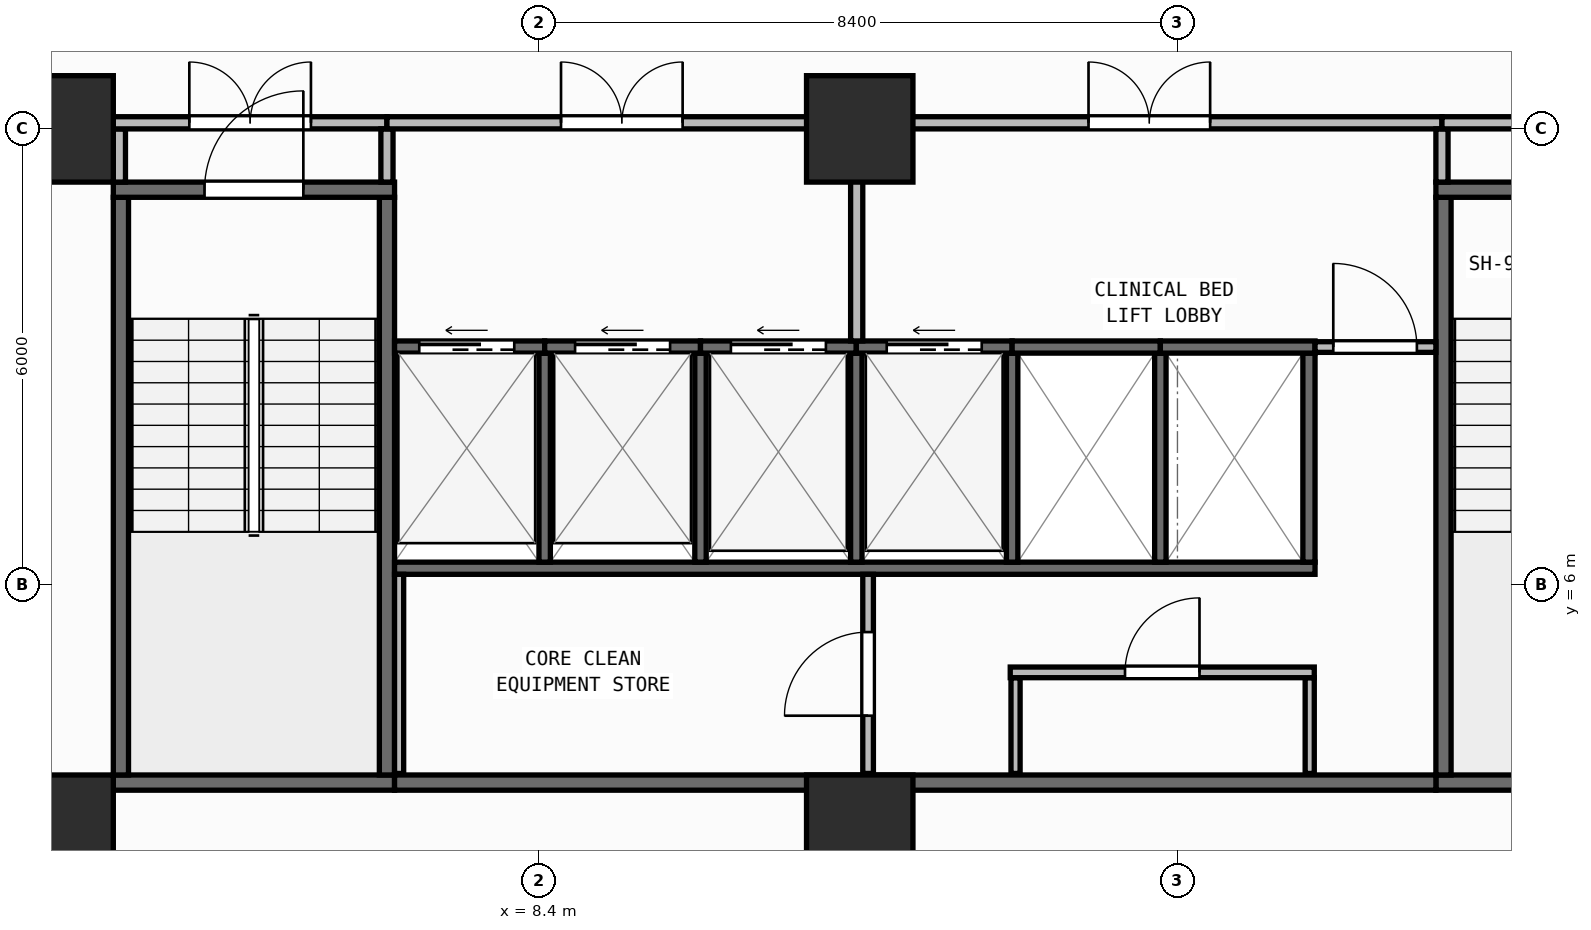
"""IFC4 building model, lengths in metres.
Left out: names, types, materials, properties, quantities, classifications, styles, units other than length and angle.
Written with IfcOpenShell. Run it as: python <this file> out.ifc"""

import sys

from ifc_helpers import new_model, si_unit, direction, frame, frame_2d, origin, origin_2d, place, context, subcontext, project, spatial, rectangle, extrude, element, fill, save


model = new_model("IFC4")
c1 = context("Model", 3, precision=1e-05, world=origin(), true_north=direction((0.0, 1.0)))
c2 = subcontext(c1, "Body", "Model", "MODEL_VIEW")
j1 = project(units=[si_unit("LENGTHUNIT", "METRE"), si_unit("PLANEANGLEUNIT", "RADIAN")], contexts=[c1])
p1 = place(None, origin())
s1 = spatial("IfcSite", under=j1, at=p1, CompositionType="ELEMENT")
p2 = place(p1, origin())
s2 = spatial("IfcBuilding", under=s1, at=p2, CompositionType="ELEMENT")
p3 = place(p2, frame((0.0, 0.0, 77.8)))
s3 = spatial("IfcBuildingStorey", under=s2, at=p3, CompositionType="ELEMENT", Elevation=77.8)
for number, where, z_axis, x_axis in (
    (1, (2.1, 2.8, 0.0), (0.0, 0.0, 1.0), (1.0, 0.0, 0.0)),
    (2, (12.62, 2.8, 0.0), (0.0, 0.0, 1.0), (1.0, 0.0, 0.0)),
    (3, (2.1, 12.0, 0.0), (0.0, 0.0, 1.0), (1.0, 0.0, 0.0)),
    (4, (12.62, 12.0, 0.0), (0.0, 0.0, 1.0), (1.0, 0.0, 0.0)),
):
    element("IfcColumn", number, at=place(p3, frame(where, z_axis=z_axis, x_axis=x_axis)), inside=s3, PredefinedType="COLUMN", context=c2, shape_type="SweptSolid", body=[
        extrude(rectangle(XDim=1.4, YDim=1.4, at=origin_2d()), origin(), (0.0, 0.0, 1.0), 3.95),
    ])
p4 = place(p3, frame((2.76, 0.174, 0.0), z_axis=(0.0, 0.0, 1.0), x_axis=(0.996571478456, 0.082736257641, 0.0)))
e5 = element("IfcWall", 5, at=p4, inside=s3, PredefinedType="STANDARD", context=c2, shape_type="SweptSolid", body=[
    extrude(rectangle(XDim=52.861, YDim=0.26, at=frame_2d((26.431, 0.0))), origin(), (0.0, 0.0, 1.0), 3.71),
])
p5 = place(p4, frame((25.231, 0.0, 0.9)))
e6 = element("IfcOpeningElement", 6, at=p5, cuts=e5, PredefinedType="OPENING", context=c2, shape_type="SweptSolid", body=[
    extrude(rectangle(XDim=2.4, YDim=1.65, at=frame_2d((1.2, 0.825))), frame((0.0, 0.14, 0.0), z_axis=(0.0, -1.0, 0.0), x_axis=(1.0, 0.0, 0.0)), (0.0, 0.0, 1.0), 0.28),
])
p6 = place(p3, frame((2.8, 3.4, 0.0), z_axis=(0.0, 0.0, 1.0), x_axis=(1.0, 0.0, 0.0)))
e7 = element("IfcWall", 7, at=p6, inside=s3, PredefinedType="SHEAR", context=c2, shape_type="SweptSolid", body=[
    extrude(rectangle(XDim=3.7, YDim=0.2, at=frame_2d((1.85, 0.0))), origin(), (0.0, 0.0, 1.0), 3.71),
])
for number, where, z_axis, x_axis in (
    (8, (2.9, 3.5, 0.0), (0.0, 0.0, 1.0), (0.0, 1.0, 0.0)),
    (9, (6.4, 3.5, 0.0), (0.0, 0.0, 1.0), (0.0, 1.0, 0.0)),
):
    element("IfcWall", number, at=place(p3, frame(where, z_axis=z_axis, x_axis=x_axis)), inside=s3, PredefinedType="SHEAR", context=c2, shape_type="SweptSolid", body=[
        extrude(rectangle(XDim=7.6, YDim=0.2, at=frame_2d((3.8, 0.0))), origin(), (0.0, 0.0, 1.0), 3.71),
    ])
p7 = place(p3, frame((2.8, 11.2, 0.0), z_axis=(0.0, 0.0, 1.0), x_axis=(1.0, 0.0, 0.0)))
e10 = element("IfcWall", 10, at=p7, inside=s3, PredefinedType="SHEAR", context=c2, shape_type="SweptSolid", body=[
    extrude(rectangle(XDim=3.7, YDim=0.2, at=frame_2d((1.85, 0.0))), origin(), (0.0, 0.0, 1.0), 3.71),
])
p8 = place(p7, frame((1.2, 0.0, 0.0)))
e11 = element("IfcOpeningElement", 11, at=p8, cuts=e10, PredefinedType="OPENING", context=c2, shape_type="SweptSolid", body=[
    extrude(rectangle(XDim=1.3, YDim=2.15, at=frame_2d((0.65, 1.075))), frame((0.0, 0.11, 0.0), z_axis=(0.0, -1.0, 0.0), x_axis=(1.0, 0.0, 0.0)), (0.0, 0.0, 1.0), 0.22),
])
p9 = place(p3, frame((20.2, 3.4, 0.0), z_axis=(0.0, 0.0, 1.0), x_axis=(1.0, 0.0, 0.0)))
e12 = element("IfcWall", 12, at=p9, inside=s3, PredefinedType="SHEAR", context=c2, shape_type="SweptSolid", body=[
    extrude(rectangle(XDim=3.7, YDim=0.2, at=frame_2d((1.85, 0.0))), origin(), (0.0, 0.0, 1.0), 3.71),
])
p10 = place(p3, frame((20.3, 3.5, 0.0), z_axis=(0.0, 0.0, 1.0), x_axis=(0.0, 1.0, 0.0)))
e13 = element("IfcWall", 13, at=p10, inside=s3, PredefinedType="SHEAR", context=c2, shape_type="SweptSolid", body=[
    extrude(rectangle(XDim=7.6, YDim=0.2, at=frame_2d((3.8, 0.0))), origin(), (0.0, 0.0, 1.0), 3.71),
])
p11 = place(p3, frame((20.2, 11.2, 0.0), z_axis=(0.0, 0.0, 1.0), x_axis=(1.0, 0.0, 0.0)))
e14 = element("IfcWall", 14, at=p11, inside=s3, PredefinedType="SHEAR", context=c2, shape_type="SweptSolid", body=[
    extrude(rectangle(XDim=3.7, YDim=0.2, at=frame_2d((1.85, 0.0))), origin(), (0.0, 0.0, 1.0), 3.71),
])
p12 = place(p11, frame((1.2, 0.0, 0.0)))
e15 = element("IfcOpeningElement", 15, at=p12, cuts=e14, PredefinedType="OPENING", context=c2, shape_type="SweptSolid", body=[
    extrude(rectangle(XDim=1.3, YDim=2.15, at=frame_2d((0.65, 1.075))), frame((0.0, 0.11, 0.0), z_axis=(0.0, -1.0, 0.0), x_axis=(1.0, 0.0, 0.0)), (0.0, 0.0, 1.0), 0.22),
])
p13 = place(p3, frame((6.5, 3.4, 0.0), z_axis=(0.0, 0.0, 1.0), x_axis=(1.0, 0.0, 0.0)))
e16 = element("IfcWall", 16, at=p13, inside=s3, PredefinedType="SHEAR", context=c2, shape_type="SweptSolid", body=[
    extrude(rectangle(XDim=13.7, YDim=0.2, at=frame_2d((6.85, 0.0))), origin(), (0.0, 0.0, 1.0), 3.71),
])
p14 = place(p3, frame((6.5, 6.22, 0.0), z_axis=(0.0, 0.0, 1.0), x_axis=(1.0, 0.0, 0.0)))
e17 = element("IfcWall", 17, at=p14, inside=s3, PredefinedType="SHEAR", context=c2, shape_type="SweptSolid", body=[
    extrude(rectangle(XDim=12.11, YDim=0.16, at=frame_2d((6.055, 0.0))), origin(), (0.0, 0.0, 1.0), 3.71),
])
p15 = place(p3, frame((18.53, 6.3, 0.0), z_axis=(0.0, 0.0, 1.0), x_axis=(0.0, 1.0, 0.0)))
e18 = element("IfcWall", 18, at=p15, inside=s3, PredefinedType="SHEAR", context=c2, shape_type="SweptSolid", body=[
    extrude(rectangle(XDim=2.75, YDim=0.16, at=frame_2d((1.375, 0.0))), origin(), (0.0, 0.0, 1.0), 3.71),
])
for number, where, z_axis, x_axis in (
    (19, (8.475, 6.3, 0.0), (0.0, 0.0, 1.0), (0.0, 1.0, 0.0)),
    (20, (10.525, 6.3, 0.0), (0.0, 0.0, 1.0), (0.0, 1.0, 0.0)),
    (21, (12.575, 6.3, 0.0), (0.0, 0.0, 1.0), (0.0, 1.0, 0.0)),
    (22, (14.625, 6.3, 0.0), (0.0, 0.0, 1.0), (0.0, 1.0, 0.0)),
    (23, (16.575, 6.3, 0.0), (0.0, 0.0, 1.0), (0.0, 1.0, 0.0)),
):
    element("IfcWall", number, at=place(p3, frame(where, z_axis=z_axis, x_axis=x_axis)), inside=s3, PredefinedType="SHEAR", context=c2, shape_type="SweptSolid", body=[
        extrude(rectangle(XDim=2.75, YDim=0.15, at=frame_2d((1.375, 0.0))), origin(), (0.0, 0.0, 1.0), 3.71),
    ])
p16 = place(p3, frame((6.5, 9.13, 0.0), z_axis=(0.0, 0.0, 1.0), x_axis=(1.0, 0.0, 0.0)))
e24 = element("IfcWall", 24, at=p16, inside=s3, PredefinedType="SHEAR", context=c2, shape_type="SweptSolid", body=[
    extrude(rectangle(XDim=1.975, YDim=0.16, at=frame_2d((0.988, 0.0))), origin(), (0.0, 0.0, 1.0), 3.71),
])
p17 = place(p16, frame((0.325, 0.0, 0.0)))
e25 = element("IfcOpeningElement", 25, at=p17, cuts=e24, PredefinedType="OPENING", context=c2, shape_type="SweptSolid", body=[
    extrude(rectangle(XDim=1.25, YDim=2.15, at=frame_2d((0.625, 1.075))), frame((0.0, 0.09, 0.0), z_axis=(0.0, -1.0, 0.0), x_axis=(1.0, 0.0, 0.0)), (0.0, 0.0, 1.0), 0.18),
])
p18 = place(p3, frame((8.475, 9.13, 0.0), z_axis=(0.0, 0.0, 1.0), x_axis=(1.0, 0.0, 0.0)))
e26 = element("IfcWall", 26, at=p18, inside=s3, PredefinedType="SHEAR", context=c2, shape_type="SweptSolid", body=[
    extrude(rectangle(XDim=2.05, YDim=0.16, at=frame_2d((1.025, 0.0))), origin(), (0.0, 0.0, 1.0), 3.71),
])
p19 = place(p18, frame((0.4, 0.0, 0.0)))
e27 = element("IfcOpeningElement", 27, at=p19, cuts=e26, PredefinedType="OPENING", context=c2, shape_type="SweptSolid", body=[
    extrude(rectangle(XDim=1.25, YDim=2.15, at=frame_2d((0.625, 1.075))), frame((0.0, 0.09, 0.0), z_axis=(0.0, -1.0, 0.0), x_axis=(1.0, 0.0, 0.0)), (0.0, 0.0, 1.0), 0.18),
])
p20 = place(p3, frame((10.525, 9.13, 0.0), z_axis=(0.0, 0.0, 1.0), x_axis=(1.0, 0.0, 0.0)))
e28 = element("IfcWall", 28, at=p20, inside=s3, PredefinedType="SHEAR", context=c2, shape_type="SweptSolid", body=[
    extrude(rectangle(XDim=2.05, YDim=0.16, at=frame_2d((1.025, 0.0))), origin(), (0.0, 0.0, 1.0), 3.71),
])
p21 = place(p20, frame((0.4, 0.0, 0.0)))
e29 = element("IfcOpeningElement", 29, at=p21, cuts=e28, PredefinedType="OPENING", context=c2, shape_type="SweptSolid", body=[
    extrude(rectangle(XDim=1.25, YDim=2.15, at=frame_2d((0.625, 1.075))), frame((0.0, 0.09, 0.0), z_axis=(0.0, -1.0, 0.0), x_axis=(1.0, 0.0, 0.0)), (0.0, 0.0, 1.0), 0.18),
])
p22 = place(p3, frame((12.575, 9.13, 0.0), z_axis=(0.0, 0.0, 1.0), x_axis=(1.0, 0.0, 0.0)))
e30 = element("IfcWall", 30, at=p22, inside=s3, PredefinedType="SHEAR", context=c2, shape_type="SweptSolid", body=[
    extrude(rectangle(XDim=2.05, YDim=0.16, at=frame_2d((1.025, 0.0))), origin(), (0.0, 0.0, 1.0), 3.71),
])
p23 = place(p22, frame((0.4, 0.0, 0.0)))
e31 = element("IfcOpeningElement", 31, at=p23, cuts=e30, PredefinedType="OPENING", context=c2, shape_type="SweptSolid", body=[
    extrude(rectangle(XDim=1.25, YDim=2.15, at=frame_2d((0.625, 1.075))), frame((0.0, 0.09, 0.0), z_axis=(0.0, -1.0, 0.0), x_axis=(1.0, 0.0, 0.0)), (0.0, 0.0, 1.0), 0.18),
])
p24 = place(p3, frame((14.625, 9.13, 0.0), z_axis=(0.0, 0.0, 1.0), x_axis=(1.0, 0.0, 0.0)))
e32 = element("IfcWall", 32, at=p24, inside=s3, PredefinedType="SHEAR", context=c2, shape_type="SweptSolid", body=[
    extrude(rectangle(XDim=1.95, YDim=0.16, at=frame_2d((0.975, 0.0))), origin(), (0.0, 0.0, 1.0), 3.71),
])
p25 = place(p3, frame((16.575, 9.13, 0.0), z_axis=(0.0, 0.0, 1.0), x_axis=(1.0, 0.0, 0.0)))
e33 = element("IfcWall", 33, at=p25, inside=s3, PredefinedType="SHEAR", context=c2, shape_type="SweptSolid", body=[
    extrude(rectangle(XDim=2.035, YDim=0.16, at=frame_2d((1.018, 0.0))), origin(), (0.0, 0.0, 1.0), 3.71),
])
p26 = place(p3, frame((6.56, 3.52, 0.0), z_axis=(0.0, 0.0, 1.0), x_axis=(0.0, 1.0, 0.0)))
e34 = element("IfcWall", 34, at=p26, inside=s3, PredefinedType="PARTITIONING", context=c2, shape_type="SweptSolid", body=[
    extrude(rectangle(XDim=2.62, YDim=0.12, at=frame_2d((1.31, 0.0))), origin(), (0.0, 0.0, 1.0), 3.71),
])
p27 = place(p3, frame((12.73, 3.52, 0.0), z_axis=(0.0, 0.0, 1.0), x_axis=(0.0, 1.0, 0.0)))
e35 = element("IfcWall", 35, at=p27, inside=s3, PredefinedType="PARTITIONING", context=c2, shape_type="SweptSolid", body=[
    extrude(rectangle(XDim=2.62, YDim=0.14, at=frame_2d((1.31, 0.0))), origin(), (0.0, 0.0, 1.0), 3.71),
])
p28 = place(p27, frame((0.76, 0.0, 0.0)))
e36 = element("IfcOpeningElement", 36, at=p28, cuts=e35, PredefinedType="OPENING", context=c2, shape_type="SweptSolid", body=[
    extrude(rectangle(XDim=1.1, YDim=2.1, at=frame_2d((0.55, 1.05))), frame((0.0, 0.08, 0.0), z_axis=(0.0, -1.0, 0.0), x_axis=(1.0, 0.0, 0.0)), (0.0, 0.0, 1.0), 0.16),
])
for number, where, z_axis, x_axis in (
    (37, (14.67, 3.52, 0.0), (0.0, 0.0, 1.0), (0.0, 1.0, 0.0)),
    (38, (18.54, 3.52, 0.0), (0.0, 0.0, 1.0), (0.0, 1.0, 0.0)),
):
    element("IfcWall", number, at=place(p3, frame(where, z_axis=z_axis, x_axis=x_axis)), inside=s3, PredefinedType="PARTITIONING", context=c2, shape_type="SweptSolid", body=[
        extrude(rectangle(XDim=1.26, YDim=0.12, at=frame_2d((0.63, 0.0))), origin(), (0.0, 0.0, 1.0), 3.71),
    ])
p29 = place(p3, frame((14.6, 4.85, 0.0), z_axis=(0.0, 0.0, 1.0), x_axis=(1.0, 0.0, 0.0)))
e39 = element("IfcWall", 39, at=p29, inside=s3, PredefinedType="PARTITIONING", context=c2, shape_type="SweptSolid", body=[
    extrude(rectangle(XDim=4.0, YDim=0.14, at=frame_2d((2.0, 0.0))), origin(), (0.0, 0.0, 1.0), 3.71),
])
p30 = place(p29, frame((1.51, 0.0, 0.0)))
e40 = element("IfcOpeningElement", 40, at=p30, cuts=e39, PredefinedType="OPENING", context=c2, shape_type="SweptSolid", body=[
    extrude(rectangle(XDim=0.98, YDim=2.1, at=frame_2d((0.49, 1.05))), frame((0.0, 0.08, 0.0), z_axis=(0.0, -1.0, 0.0), x_axis=(1.0, 0.0, 0.0)), (0.0, 0.0, 1.0), 0.16),
])
p31 = place(p3, frame((18.61, 9.13, 0.0), z_axis=(0.0, 0.0, 1.0), x_axis=(1.0, 0.0, 0.0)))
e41 = element("IfcWall", 41, at=p31, inside=s3, PredefinedType="PARTITIONING", context=c2, shape_type="SweptSolid", body=[
    extrude(rectangle(XDim=1.59, YDim=0.14, at=frame_2d((0.795, 0.0))), origin(), (0.0, 0.0, 1.0), 3.71),
])
p32 = place(p31, frame((0.24, 0.0, 0.0)))
e42 = element("IfcOpeningElement", 42, at=p32, cuts=e41, PredefinedType="OPENING", context=c2, shape_type="SweptSolid", body=[
    extrude(rectangle(XDim=1.1, YDim=2.1, at=frame_2d((0.55, 1.05))), frame((0.0, 0.08, 0.0), z_axis=(0.0, -1.0, 0.0), x_axis=(1.0, 0.0, 0.0)), (0.0, 0.0, 1.0), 0.16),
])
p33 = place(p3, frame((2.88, 11.3, 0.0), z_axis=(0.0, 0.0, 1.0), x_axis=(0.0, 1.0, 0.0)))
e43 = element("IfcWall", 43, at=p33, inside=s3, PredefinedType="PARTITIONING", context=c2, shape_type="SweptSolid", body=[
    extrude(rectangle(XDim=0.7, YDim=0.16, at=frame_2d((0.35, 0.0))), origin(), (0.0, 0.0, 1.0), 3.71),
])
p34 = place(p3, frame((2.8, 12.08, 0.0), z_axis=(0.0, 0.0, 1.0), x_axis=(1.0, 0.0, 0.0)))
e44 = element("IfcWall", 44, at=p34, inside=s3, PredefinedType="PARTITIONING", context=c2, shape_type="SweptSolid", body=[
    extrude(rectangle(XDim=3.6, YDim=0.16, at=frame_2d((1.8, 0.0))), origin(), (0.0, 0.0, 1.0), 3.073),
])
p35 = place(p34, frame((1.0, 0.0, 0.0)))
e45 = element("IfcOpeningElement", 45, at=p35, cuts=e44, PredefinedType="OPENING", context=c2, shape_type="SweptSolid", body=[
    extrude(rectangle(XDim=1.6, YDim=2.05, at=frame_2d((0.8, 1.025))), frame((0.0, 0.09, 0.0), z_axis=(0.0, -1.0, 0.0), x_axis=(1.0, 0.0, 0.0)), (0.0, 0.0, 1.0), 0.18),
])
p36 = place(p3, frame((6.4, 11.3, 0.0), z_axis=(0.0, 0.0, 1.0), x_axis=(0.0, 1.0, 0.0)))
e46 = element("IfcWall", 46, at=p36, inside=s3, PredefinedType="PARTITIONING", context=c2, shape_type="SweptSolid", body=[
    extrude(rectangle(XDim=0.7, YDim=0.16, at=frame_2d((0.35, 0.0))), origin(), (0.0, 0.0, 1.0), 3.71),
])
p37 = place(p3, frame((6.4, 12.08, 0.0), z_axis=(0.0, 0.0, 1.0), x_axis=(1.0, 0.0, 0.0)))
e47 = element("IfcWall", 47, at=p37, inside=s3, PredefinedType="PARTITIONING", context=c2, shape_type="SweptSolid", body=[
    extrude(rectangle(XDim=6.18, YDim=0.16, at=frame_2d((3.09, 0.0))), origin(), (0.0, 0.0, 1.0), 3.073),
])
p38 = place(p37, frame((2.29, 0.0, 0.0)))
e48 = element("IfcOpeningElement", 48, at=p38, cuts=e47, PredefinedType="OPENING", context=c2, shape_type="SweptSolid", body=[
    extrude(rectangle(XDim=1.6, YDim=2.05, at=frame_2d((0.8, 1.025))), frame((0.0, 0.09, 0.0), z_axis=(0.0, -1.0, 0.0), x_axis=(1.0, 0.0, 0.0)), (0.0, 0.0, 1.0), 0.18),
])
p39 = place(p3, frame((12.58, 9.21, 0.0), z_axis=(0.0, 0.0, 1.0), x_axis=(0.0, 1.0, 0.0)))
e49 = element("IfcWall", 49, at=p39, inside=s3, PredefinedType="PARTITIONING", context=c2, shape_type="SweptSolid", body=[
    extrude(rectangle(XDim=2.79, YDim=0.16, at=frame_2d((1.395, 0.0))), origin(), (0.0, 0.0, 1.0), 3.71),
])
p40 = place(p3, frame((12.58, 12.08, 0.0), z_axis=(0.0, 0.0, 1.0), x_axis=(1.0, 0.0, 0.0)))
e50 = element("IfcWall", 50, at=p40, inside=s3, PredefinedType="PARTITIONING", context=c2, shape_type="SweptSolid", body=[
    extrude(rectangle(XDim=7.7, YDim=0.16, at=frame_2d((3.85, 0.0))), origin(), (0.0, 0.0, 1.0), 3.073),
])
p41 = place(p40, frame((3.05, 0.0, 0.0)))
e51 = element("IfcOpeningElement", 51, at=p41, cuts=e50, PredefinedType="OPENING", context=c2, shape_type="SweptSolid", body=[
    extrude(rectangle(XDim=1.6, YDim=2.05, at=frame_2d((0.8, 1.025))), frame((0.0, 0.09, 0.0), z_axis=(0.0, -1.0, 0.0), x_axis=(1.0, 0.0, 0.0)), (0.0, 0.0, 1.0), 0.18),
])
p42 = place(p3, frame((20.28, 11.3, 0.0), z_axis=(0.0, 0.0, 1.0), x_axis=(0.0, 1.0, 0.0)))
e52 = element("IfcWall", 52, at=p42, inside=s3, PredefinedType="PARTITIONING", context=c2, shape_type="SweptSolid", body=[
    extrude(rectangle(XDim=0.7, YDim=0.16, at=frame_2d((0.35, 0.0))), origin(), (0.0, 0.0, 1.0), 3.71),
])
p43 = place(p3, frame((20.28, 12.08, 0.0), z_axis=(0.0, 0.0, 1.0), x_axis=(1.0, 0.0, 0.0)))
e53 = element("IfcWall", 53, at=p43, inside=s3, PredefinedType="PARTITIONING", context=c2, shape_type="SweptSolid", body=[
    extrude(rectangle(XDim=3.62, YDim=0.16, at=frame_2d((1.81, 0.0))), origin(), (0.0, 0.0, 1.0), 3.073),
])
p44 = place(p43, frame((1.01, 0.0, 0.0)))
e54 = element("IfcOpeningElement", 54, at=p44, cuts=e53, PredefinedType="OPENING", context=c2, shape_type="SweptSolid", body=[
    extrude(rectangle(XDim=1.6, YDim=2.05, at=frame_2d((0.8, 1.025))), frame((0.0, 0.09, 0.0), z_axis=(0.0, -1.0, 0.0), x_axis=(1.0, 0.0, 0.0)), (0.0, 0.0, 1.0), 0.18),
])
p45 = place(p8, origin())
e55 = element("IfcDoor", 55, at=p45, inside=s3, OperationType="SINGLE_SWING_RIGHT", PredefinedType="DOOR", context=c2, shape_type="SweptSolid", body=[
    extrude(rectangle(XDim=1.3, YDim=2.15, at=frame_2d((0.65, 1.075))), frame((0.0, 0.025, 0.0), z_axis=(0.0, -1.0, 0.0), x_axis=(1.0, 0.0, 0.0)), (0.0, 0.0, 1.0), 0.05),
])
fill(e11, e55)
p46 = place(p17, origin())
e56 = element("IfcDoor", 56, at=p46, inside=s3, OperationType="SLIDING_TO_LEFT", PredefinedType="DOOR", context=c2, shape_type="SweptSolid", body=[
    extrude(rectangle(XDim=1.25, YDim=2.15, at=frame_2d((0.625, 1.075))), frame((0.0, 0.025, 0.0), z_axis=(0.0, -1.0, 0.0), x_axis=(1.0, 0.0, 0.0)), (0.0, 0.0, 1.0), 0.05),
])
fill(e25, e56)
p47 = place(p19, origin())
e57 = element("IfcDoor", 57, at=p47, inside=s3, OperationType="SLIDING_TO_LEFT", PredefinedType="DOOR", context=c2, shape_type="SweptSolid", body=[
    extrude(rectangle(XDim=1.25, YDim=2.15, at=frame_2d((0.625, 1.075))), frame((0.0, 0.025, 0.0), z_axis=(0.0, -1.0, 0.0), x_axis=(1.0, 0.0, 0.0)), (0.0, 0.0, 1.0), 0.05),
])
fill(e27, e57)
p48 = place(p21, origin())
e58 = element("IfcDoor", 58, at=p48, inside=s3, OperationType="SLIDING_TO_LEFT", PredefinedType="DOOR", context=c2, shape_type="SweptSolid", body=[
    extrude(rectangle(XDim=1.25, YDim=2.15, at=frame_2d((0.625, 1.075))), frame((0.0, 0.025, 0.0), z_axis=(0.0, -1.0, 0.0), x_axis=(1.0, 0.0, 0.0)), (0.0, 0.0, 1.0), 0.05),
])
fill(e29, e58)
p49 = place(p23, origin())
e59 = element("IfcDoor", 59, at=p49, inside=s3, OperationType="SLIDING_TO_LEFT", PredefinedType="DOOR", context=c2, shape_type="SweptSolid", body=[
    extrude(rectangle(XDim=1.25, YDim=2.15, at=frame_2d((0.625, 1.075))), frame((0.0, 0.025, 0.0), z_axis=(0.0, -1.0, 0.0), x_axis=(1.0, 0.0, 0.0)), (0.0, 0.0, 1.0), 0.05),
])
fill(e31, e59)
p50 = place(p28, origin())
e60 = element("IfcDoor", 60, at=p50, inside=s3, OperationType="SINGLE_SWING_LEFT", PredefinedType="DOOR", context=c2, shape_type="SweptSolid", body=[
    extrude(rectangle(XDim=1.1, YDim=2.1, at=frame_2d((0.55, 1.05))), frame((0.0, 0.025, 0.0), z_axis=(0.0, -1.0, 0.0), x_axis=(1.0, 0.0, 0.0)), (0.0, 0.0, 1.0), 0.05),
])
fill(e36, e60)
p51 = place(p30, origin())
e61 = element("IfcDoor", 61, at=p51, inside=s3, OperationType="SINGLE_SWING_RIGHT", PredefinedType="DOOR", context=c2, shape_type="SweptSolid", body=[
    extrude(rectangle(XDim=0.98, YDim=2.1, at=frame_2d((0.49, 1.05))), frame((0.0, 0.025, 0.0), z_axis=(0.0, -1.0, 0.0), x_axis=(1.0, 0.0, 0.0)), (0.0, 0.0, 1.0), 0.05),
])
fill(e40, e61)
p52 = place(p32, origin())
e62 = element("IfcDoor", 62, at=p52, inside=s3, OperationType="SINGLE_SWING_LEFT", PredefinedType="DOOR", context=c2, shape_type="SweptSolid", body=[
    extrude(rectangle(XDim=1.1, YDim=2.1, at=frame_2d((0.55, 1.05))), frame((0.0, 0.025, 0.0), z_axis=(0.0, -1.0, 0.0), x_axis=(1.0, 0.0, 0.0)), (0.0, 0.0, 1.0), 0.05),
])
fill(e42, e62)
p53 = place(p35, origin())
e63 = element("IfcDoor", 63, at=p53, inside=s3, OperationType="DOUBLE_DOOR_SINGLE_SWING", PredefinedType="DOOR", context=c2, shape_type="SweptSolid", body=[
    extrude(rectangle(XDim=1.6, YDim=2.05, at=frame_2d((0.8, 1.025))), frame((0.0, 0.025, 0.0), z_axis=(0.0, -1.0, 0.0), x_axis=(1.0, 0.0, 0.0)), (0.0, 0.0, 1.0), 0.05),
])
fill(e45, e63)
p54 = place(p38, origin())
e64 = element("IfcDoor", 64, at=p54, inside=s3, OperationType="DOUBLE_DOOR_SINGLE_SWING", PredefinedType="DOOR", context=c2, shape_type="SweptSolid", body=[
    extrude(rectangle(XDim=1.6, YDim=2.05, at=frame_2d((0.8, 1.025))), frame((0.0, 0.025, 0.0), z_axis=(0.0, -1.0, 0.0), x_axis=(1.0, 0.0, 0.0)), (0.0, 0.0, 1.0), 0.05),
])
fill(e48, e64)
p55 = place(p41, origin())
e65 = element("IfcDoor", 65, at=p55, inside=s3, OperationType="DOUBLE_DOOR_SINGLE_SWING", PredefinedType="DOOR", context=c2, shape_type="SweptSolid", body=[
    extrude(rectangle(XDim=1.6, YDim=2.05, at=frame_2d((0.8, 1.025))), frame((0.0, 0.025, 0.0), z_axis=(0.0, -1.0, 0.0), x_axis=(1.0, 0.0, 0.0)), (0.0, 0.0, 1.0), 0.05),
])
fill(e51, e65)
save(model, sys.argv[1])
